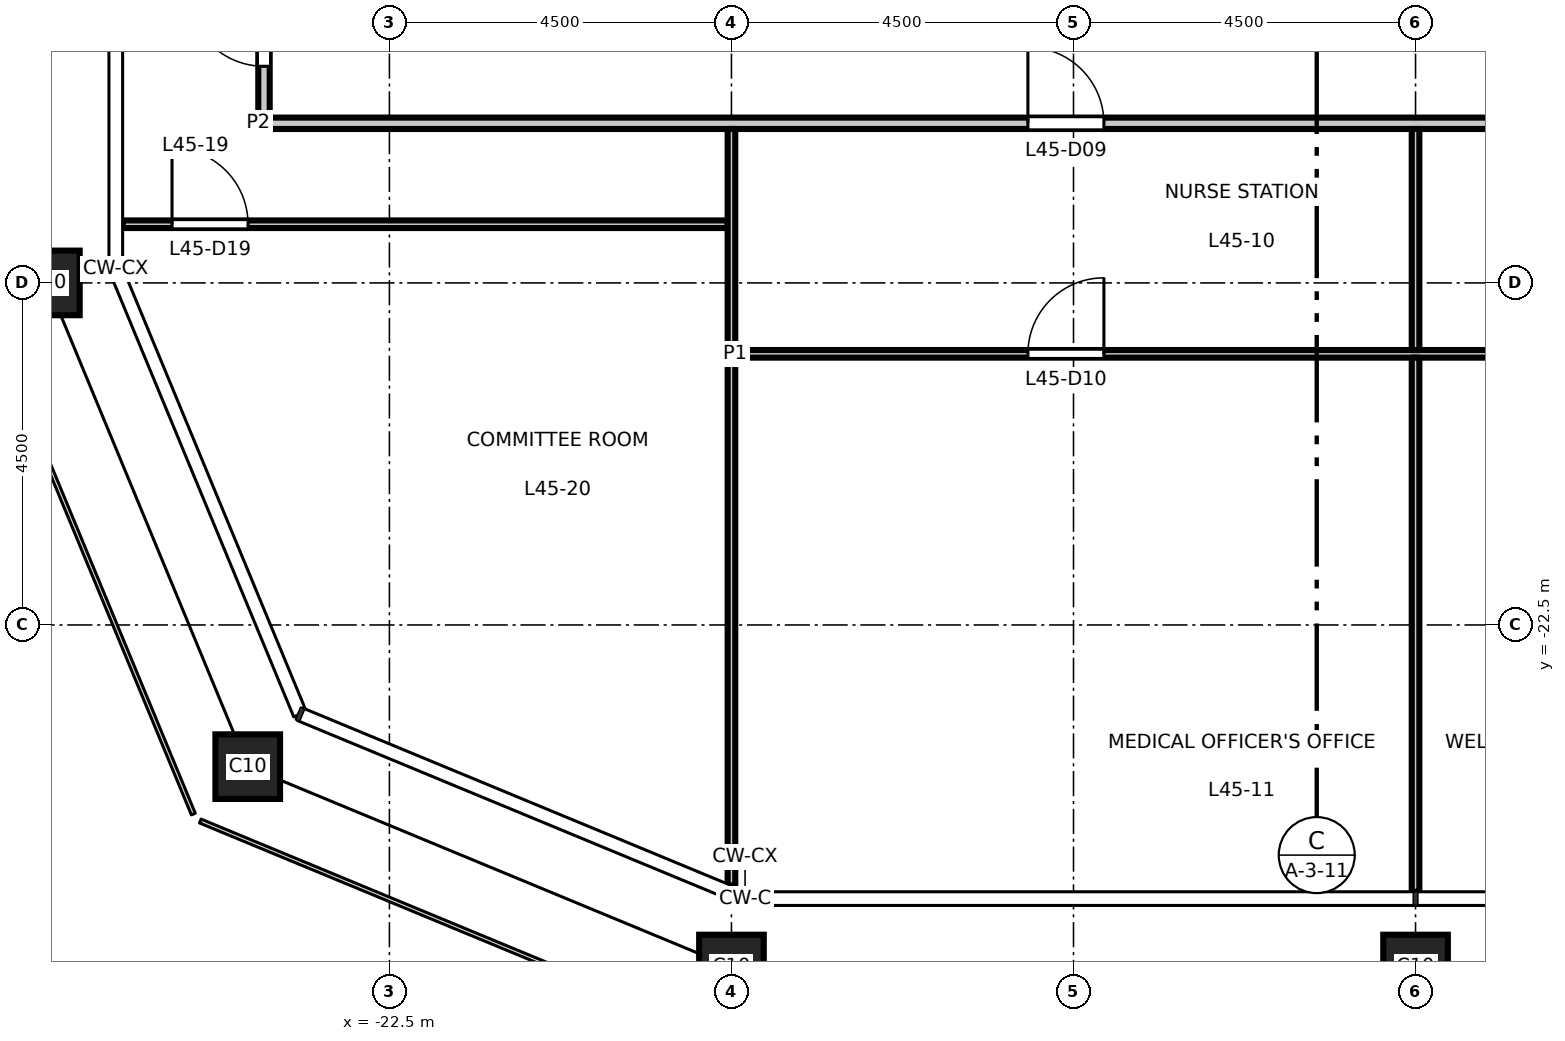
"""IFC4 building model, lengths in metres.
Left out: names, types, materials, properties, quantities, classifications, styles, units other than length and angle.
Written with IfcOpenShell. Run it as: python <this file> out.ifc"""

import sys

from ifc_helpers import new_model, si_unit, direction, frame, frame_2d, origin, origin_2d, place, context, subcontext, project, spatial, rectangle, hollow_rectangle, extrude, element, fill, save


model = new_model("IFC4")
c1 = context("Model", 3, precision=1e-05, world=origin(), true_north=direction((0.0, 1.0)))
c2 = subcontext(c1, "Body", "Model", "MODEL_VIEW")
j1 = project(units=[si_unit("LENGTHUNIT", "METRE"), si_unit("PLANEANGLEUNIT", "RADIAN")], contexts=[c1])
p1 = place(None, origin())
s1 = spatial("IfcSite", under=j1, at=p1, CompositionType="ELEMENT")
p2 = place(p1, origin())
s2 = spatial("IfcBuilding", under=s1, at=p2, CompositionType="ELEMENT")
p3 = place(p2, frame((0.0, 0.0, 210.7)))
s3 = spatial("IfcBuildingStorey", under=s2, at=p3, CompositionType="ELEMENT", Elevation=210.7)
for number, where, z_axis, x_axis in (
    (1, (-18.0, -27.0, 0.0), (0.0, 0.0, 1.0), (1.0, 0.0, 0.0)),
    (2, (-9.0, -27.0, 0.0), (0.0, 0.0, 1.0), (1.0, 0.0, 0.0)),
    (3, (-27.0, -18.0, 0.0), (0.0, 0.0, 1.0), (1.0, 0.0, 0.0)),
    (4, (-24.364, -24.364, 0.0), (0.0, 0.0, 1.0), (1.0, 0.0, 0.0)),
):
    element("IfcColumn", number, at=place(p3, frame(where, z_axis=z_axis, x_axis=x_axis)), inside=s3, PredefinedType="COLUMN", context=c2, shape_type="SweptSolid", body=[
        extrude(hollow_rectangle(XDim=0.85, YDim=0.85, WallThickness=0.05, at=origin_2d()), origin(), (0.0, 0.0, 1.0), 4.5),
    ])
p4 = place(p3, frame((-17.95, -18.933, 0.0), z_axis=(0.0, 0.0, 1.0), x_axis=(1.0, 0.0, 0.0)))
e5 = element("IfcWall", 5, at=p4, inside=s3, PredefinedType="PARTITIONING", context=c2, shape_type="SweptSolid", body=[
    extrude(rectangle(XDim=17.9, YDim=0.1, at=frame_2d((8.95, 0.0))), origin(), (0.0, 0.0, 1.0), 4.35),
])
p5 = place(p4, frame((3.85, 0.0, 0.0)))
e6 = element("IfcOpeningElement", 6, at=p5, cuts=e5, PredefinedType="OPENING", context=c2, shape_type="SweptSolid", body=[
    extrude(rectangle(XDim=1.0, YDim=2.1, at=frame_2d((0.5, 1.05))), frame((0.0, 0.06, 0.0), z_axis=(0.0, -1.0, 0.0), x_axis=(1.0, 0.0, 0.0)), (0.0, 0.0, 1.0), 0.12),
])
p6 = place(p4, frame((12.85, 0.0, 0.0)))
e7 = element("IfcOpeningElement", 7, at=p6, cuts=e5, PredefinedType="OPENING", context=c2, shape_type="SweptSolid", body=[
    extrude(rectangle(XDim=1.0, YDim=2.1, at=frame_2d((0.5, 1.05))), frame((0.0, 0.06, 0.0), z_axis=(0.0, -1.0, 0.0), x_axis=(1.0, 0.0, 0.0)), (0.0, 0.0, 1.0), 0.12),
])
p7 = place(p3, frame((-26.01, -17.228, 0.0), z_axis=(0.0, 0.0, 1.0), x_axis=(1.0, 0.0, 0.0)))
e8 = element("IfcWall", 8, at=p7, inside=s3, PredefinedType="PARTITIONING", context=c2, shape_type="SweptSolid", body=[
    extrude(rectangle(XDim=7.96, YDim=0.1, at=frame_2d((3.98, 0.0))), origin(), (0.0, 0.0, 1.0), 4.35),
])
p8 = place(p7, frame((0.65, 0.0, 0.0)))
e9 = element("IfcOpeningElement", 9, at=p8, cuts=e8, PredefinedType="OPENING", context=c2, shape_type="SweptSolid", body=[
    extrude(rectangle(XDim=1.0, YDim=2.1, at=frame_2d((0.5, 1.05))), frame((0.0, 0.06, 0.0), z_axis=(0.0, -1.0, 0.0), x_axis=(1.0, 0.0, 0.0)), (0.0, 0.0, 1.0), 0.12),
])
p9 = place(p3, frame((-24.225, -15.9, 0.0), z_axis=(0.0, 0.0, 1.0), x_axis=(1.0, 0.0, 0.0)))
e10 = element("IfcWall", 10, at=p9, inside=s3, PredefinedType="PARTITIONING", context=c2, shape_type="SweptSolid", body=[
    extrude(rectangle(XDim=48.45, YDim=0.15, at=frame_2d((24.225, 0.0))), origin(), (0.0, 0.0, 1.0), 4.35),
])
p10 = place(p9, frame((10.125, 0.0, 0.0)))
e11 = element("IfcOpeningElement", 11, at=p10, cuts=e10, PredefinedType="OPENING", context=c2, shape_type="SweptSolid", body=[
    extrude(rectangle(XDim=1.0, YDim=2.1, at=frame_2d((0.5, 1.05))), frame((0.0, 0.085, 0.0), z_axis=(0.0, -1.0, 0.0), x_axis=(1.0, 0.0, 0.0)), (0.0, 0.0, 1.0), 0.17),
])
p11 = place(p9, frame((19.125, 0.0, 0.0)))
e12 = element("IfcOpeningElement", 12, at=p11, cuts=e10, PredefinedType="OPENING", context=c2, shape_type="SweptSolid", body=[
    extrude(rectangle(XDim=1.0, YDim=2.1, at=frame_2d((0.5, 1.05))), frame((0.0, 0.085, 0.0), z_axis=(0.0, -1.0, 0.0), x_axis=(1.0, 0.0, 0.0)), (0.0, 0.0, 1.0), 0.17),
])
p12 = place(p9, frame((28.125, 0.0, 0.0)))
e13 = element("IfcOpeningElement", 13, at=p12, cuts=e10, PredefinedType="OPENING", context=c2, shape_type="SweptSolid", body=[
    extrude(rectangle(XDim=1.0, YDim=2.1, at=frame_2d((0.5, 1.05))), frame((0.0, 0.085, 0.0), z_axis=(0.0, -1.0, 0.0), x_axis=(1.0, 0.0, 0.0)), (0.0, 0.0, 1.0), 0.17),
])
p13 = place(p9, frame((37.125, 0.0, 0.0)))
e14 = element("IfcOpeningElement", 14, at=p13, cuts=e10, PredefinedType="OPENING", context=c2, shape_type="SweptSolid", body=[
    extrude(rectangle(XDim=1.0, YDim=2.1, at=frame_2d((0.5, 1.05))), frame((0.0, 0.085, 0.0), z_axis=(0.0, -1.0, 0.0), x_axis=(1.0, 0.0, 0.0)), (0.0, 0.0, 1.0), 0.17),
])
p14 = place(p9, frame((44.875, 0.0, 0.0)))
e15 = element("IfcOpeningElement", 15, at=p14, cuts=e10, PredefinedType="OPENING", context=c2, shape_type="SweptSolid", body=[
    extrude(rectangle(XDim=1.0, YDim=2.1, at=frame_2d((0.5, 1.05))), frame((0.0, 0.085, 0.0), z_axis=(0.0, -1.0, 0.0), x_axis=(1.0, 0.0, 0.0)), (0.0, 0.0, 1.0), 0.17),
])
p15 = place(p3, frame((-24.15, -15.825, 0.0), z_axis=(0.0, 0.0, 1.0), x_axis=(0.0, 1.0, 0.0)))
e16 = element("IfcWall", 16, at=p15, inside=s3, PredefinedType="PARTITIONING", context=c2, shape_type="SweptSolid", body=[
    extrude(rectangle(XDim=31.65, YDim=0.15, at=frame_2d((15.825, 0.0))), origin(), (0.0, 0.0, 1.0), 4.35),
])
p16 = place(p15, frame((0.675, 0.0, 0.0)))
e17 = element("IfcOpeningElement", 17, at=p16, cuts=e16, PredefinedType="OPENING", context=c2, shape_type="SweptSolid", body=[
    extrude(rectangle(XDim=1.0, YDim=2.1, at=frame_2d((0.5, 1.05))), frame((0.0, 0.085, 0.0), z_axis=(0.0, -1.0, 0.0), x_axis=(1.0, 0.0, 0.0)), (0.0, 0.0, 1.0), 0.17),
])
p17 = place(p15, frame((4.175, 0.0, 0.0)))
e18 = element("IfcOpeningElement", 18, at=p17, cuts=e16, PredefinedType="OPENING", context=c2, shape_type="SweptSolid", body=[
    extrude(rectangle(XDim=1.0, YDim=2.1, at=frame_2d((0.5, 1.05))), frame((0.0, 0.085, 0.0), z_axis=(0.0, -1.0, 0.0), x_axis=(1.0, 0.0, 0.0)), (0.0, 0.0, 1.0), 0.17),
])
p18 = place(p15, frame((10.925, 0.0, 0.0)))
e19 = element("IfcOpeningElement", 19, at=p18, cuts=e16, PredefinedType="OPENING", context=c2, shape_type="SweptSolid", body=[
    extrude(rectangle(XDim=1.0, YDim=2.1, at=frame_2d((0.5, 1.05))), frame((0.0, 0.085, 0.0), z_axis=(0.0, -1.0, 0.0), x_axis=(1.0, 0.0, 0.0)), (0.0, 0.0, 1.0), 0.17),
])
p19 = place(p15, frame((19.925, 0.0, 0.0)))
e20 = element("IfcOpeningElement", 20, at=p19, cuts=e16, PredefinedType="OPENING", context=c2, shape_type="SweptSolid", body=[
    extrude(rectangle(XDim=1.0, YDim=2.1, at=frame_2d((0.5, 1.05))), frame((0.0, 0.085, 0.0), z_axis=(0.0, -1.0, 0.0), x_axis=(1.0, 0.0, 0.0)), (0.0, 0.0, 1.0), 0.17),
])
p20 = place(p15, frame((26.675, 0.0, 0.0)))
e21 = element("IfcOpeningElement", 21, at=p20, cuts=e16, PredefinedType="OPENING", context=c2, shape_type="SweptSolid", body=[
    extrude(rectangle(XDim=1.0, YDim=2.1, at=frame_2d((0.5, 1.05))), frame((0.0, 0.085, 0.0), z_axis=(0.0, -1.0, 0.0), x_axis=(1.0, 0.0, 0.0)), (0.0, 0.0, 1.0), 0.17),
])
p21 = place(p3, frame((-18.0, -25.928, 0.0), z_axis=(0.0, 0.0, 1.0), x_axis=(0.0, 1.0, 0.0)))
e22 = element("IfcWall", 22, at=p21, inside=s3, PredefinedType="PARTITIONING", context=c2, shape_type="SweptSolid", body=[
    extrude(rectangle(XDim=9.953, YDim=0.1, at=frame_2d((4.977, 0.0))), origin(), (0.0, 0.0, 1.0), 3.65),
])
p22 = place(p3, frame((-9.0, -26.01, 0.0), z_axis=(0.0, 0.0, 1.0), x_axis=(0.0, 1.0, 0.0)))
e23 = element("IfcWall", 23, at=p22, inside=s3, PredefinedType="PARTITIONING", context=c2, shape_type="SweptSolid", body=[
    extrude(rectangle(XDim=7.027, YDim=0.1, at=frame_2d((3.514, 0.0))), origin(), (0.0, 0.0, 1.0), 3.65),
])
p23 = place(p3, frame((-9.0, -18.883, 0.0), z_axis=(0.0, 0.0, 1.0), x_axis=(0.0, 1.0, 0.0)))
e24 = element("IfcWall", 24, at=p23, inside=s3, PredefinedType="PARTITIONING", context=c2, shape_type="SweptSolid", body=[
    extrude(rectangle(XDim=2.908, YDim=0.1, at=frame_2d((1.454, 0.0))), origin(), (0.0, 0.0, 1.0), 3.65),
])
p24 = place(p10, origin())
e25 = element("IfcDoor", 25, at=p24, inside=s3, OperationType="SINGLE_SWING_LEFT", PredefinedType="DOOR", context=c2, shape_type="SweptSolid", body=[
    extrude(rectangle(XDim=1.0, YDim=2.1, at=frame_2d((0.5, 1.05))), frame((0.0, 0.025, 0.0), z_axis=(0.0, -1.0, 0.0), x_axis=(1.0, 0.0, 0.0)), (0.0, 0.0, 1.0), 0.05),
])
fill(e11, e25)
p25 = place(p5, origin())
e26 = element("IfcDoor", 26, at=p25, inside=s3, OperationType="SINGLE_SWING_RIGHT", PredefinedType="DOOR", context=c2, shape_type="SweptSolid", body=[
    extrude(rectangle(XDim=1.0, YDim=2.1, at=frame_2d((0.5, 1.05))), frame((0.0, 0.025, 0.0), z_axis=(0.0, -1.0, 0.0), x_axis=(1.0, 0.0, 0.0)), (0.0, 0.0, 1.0), 0.05),
])
fill(e6, e26)
p26 = place(p16, origin())
e27 = element("IfcDoor", 27, at=p26, inside=s3, OperationType="SINGLE_SWING_RIGHT", PredefinedType="DOOR", context=c2, shape_type="SweptSolid", body=[
    extrude(rectangle(XDim=1.0, YDim=2.1, at=frame_2d((0.5, 1.05))), frame((0.0, 0.025, 0.0), z_axis=(0.0, -1.0, 0.0), x_axis=(1.0, 0.0, 0.0)), (0.0, 0.0, 1.0), 0.05),
])
fill(e17, e27)
p27 = place(p8, origin())
e28 = element("IfcDoor", 28, at=p27, inside=s3, OperationType="SINGLE_SWING_LEFT", PredefinedType="DOOR", context=c2, shape_type="SweptSolid", body=[
    extrude(rectangle(XDim=1.0, YDim=2.1, at=frame_2d((0.5, 1.05))), frame((0.0, 0.025, 0.0), z_axis=(0.0, -1.0, 0.0), x_axis=(1.0, 0.0, 0.0)), (0.0, 0.0, 1.0), 0.05),
])
fill(e9, e28)
save(model, sys.argv[1])
